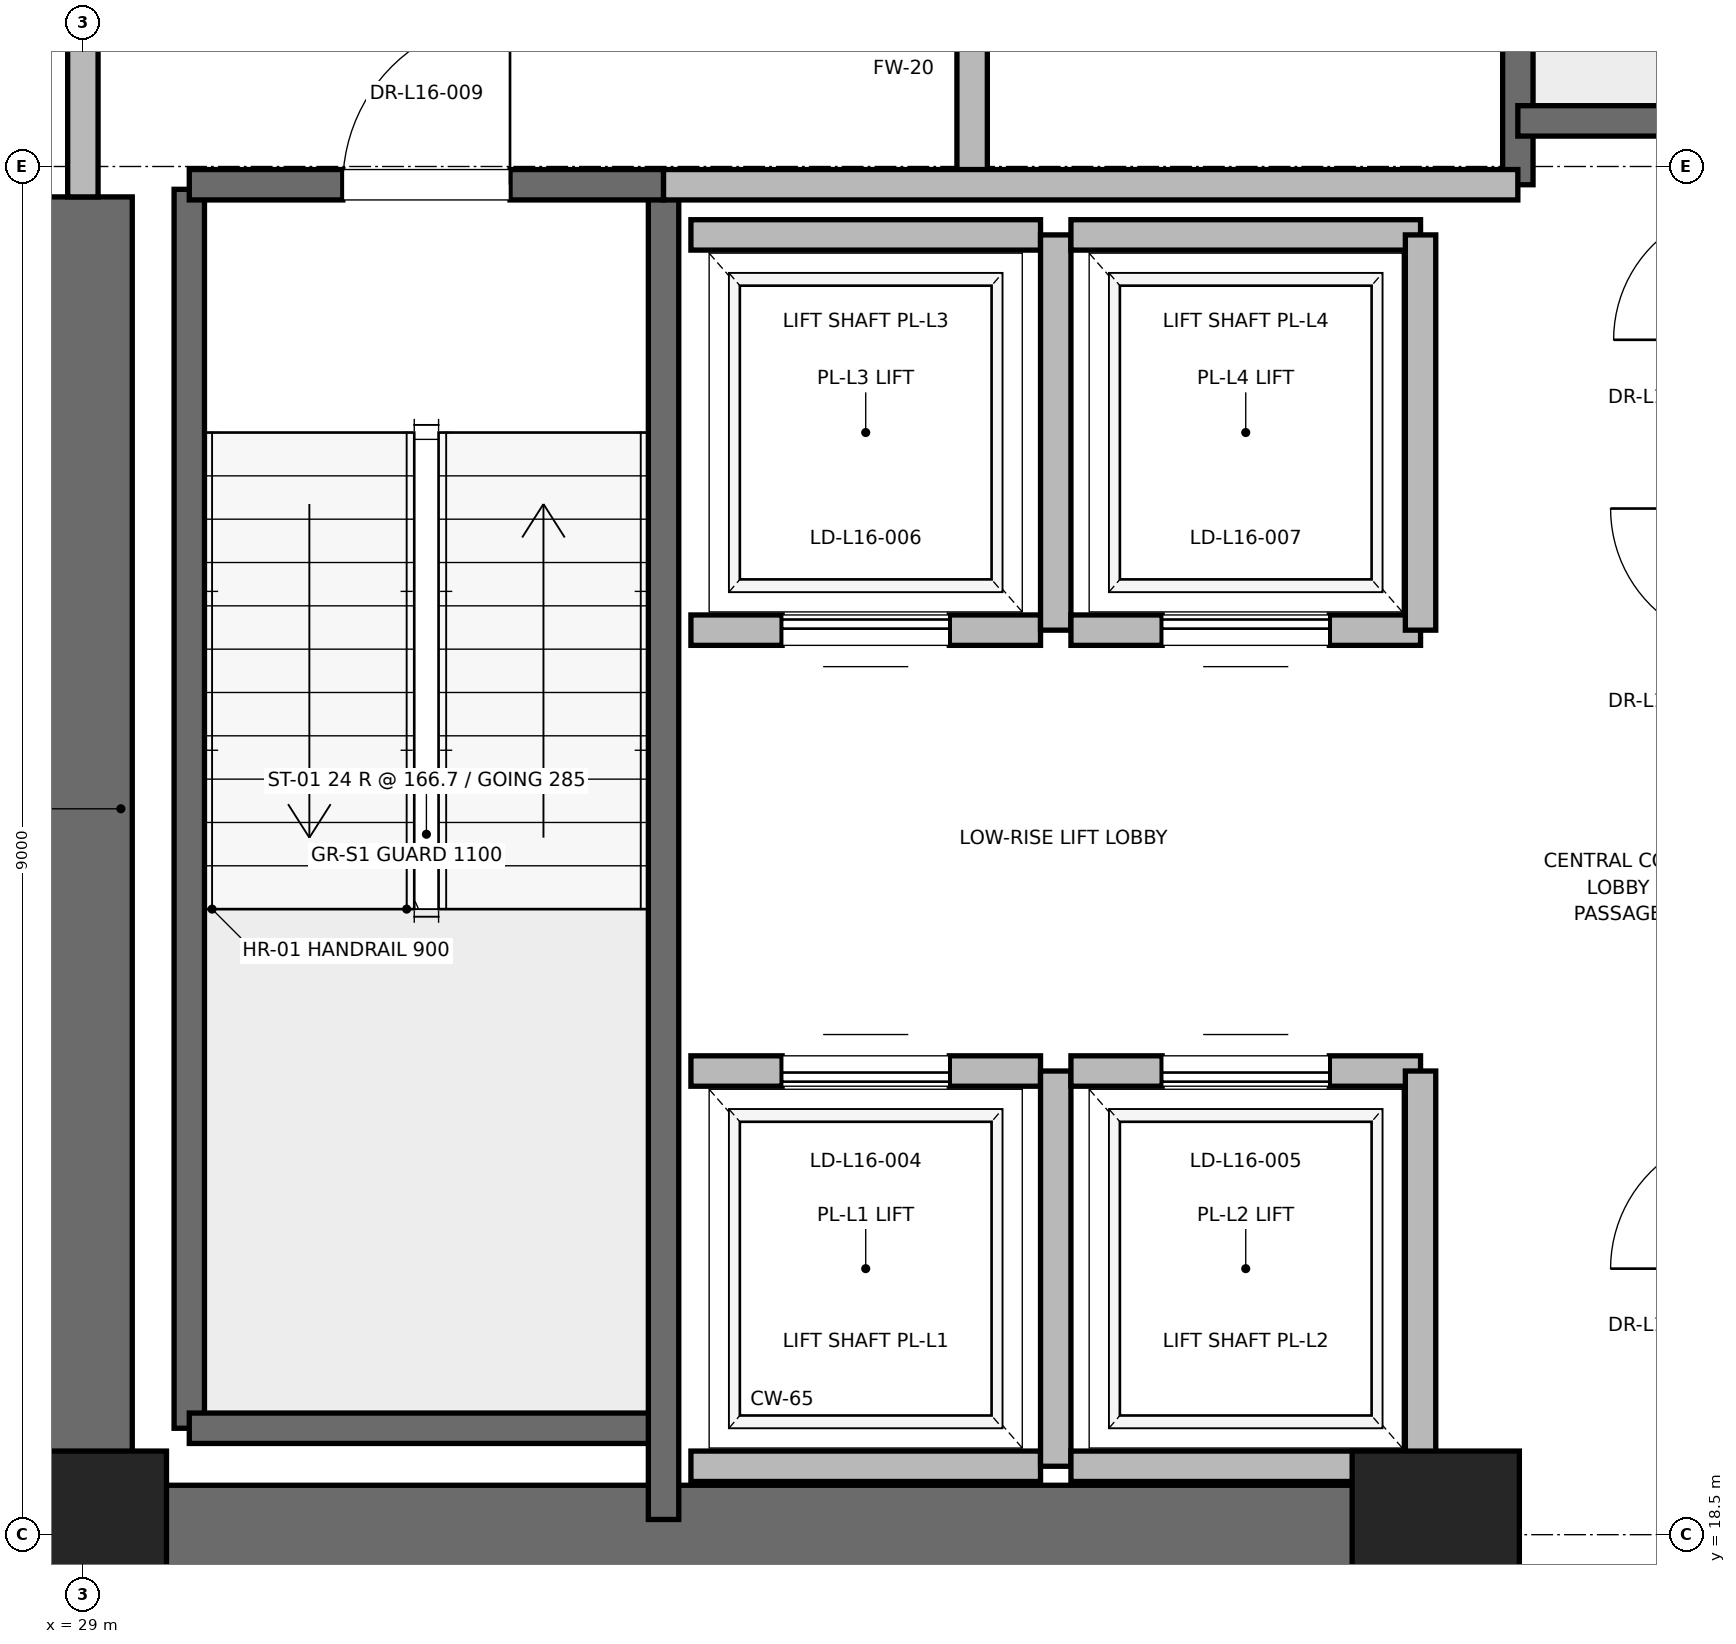
"""IFC4 building model, lengths in metres.
Left out: names, types, materials, properties, quantities, classifications, styles, units other than length and angle.
Written with IfcOpenShell. Run it as: python <this file> out.ifc"""

import sys

from ifc_helpers import new_model, si_unit, direction, frame, frame_2d, origin, origin_2d, place, context, subcontext, project, spatial, rectangle, extrude, element, fill, save


model = new_model("IFC4")
c1 = context("Model", 3, precision=1e-05, world=origin(), true_north=direction((0.0, 1.0)))
c2 = subcontext(c1, "Body", "Model", "MODEL_VIEW")
j1 = project(units=[si_unit("LENGTHUNIT", "METRE"), si_unit("PLANEANGLEUNIT", "RADIAN")], contexts=[c1])
p1 = place(None, origin())
s1 = spatial("IfcSite", under=j1, at=p1, CompositionType="ELEMENT")
p2 = place(p1, origin())
s2 = spatial("IfcBuilding", under=s1, at=p2, CompositionType="ELEMENT")
p3 = place(p2, frame((0.0, 0.0, 71.6)))
s3 = spatial("IfcBuildingStorey", under=s2, at=p3, CompositionType="ELEMENT", Elevation=71.6)
for number, where, z_axis, x_axis in (
    (1, (29.0, 18.5, 0.0), (0.0, 0.0, 1.0), (1.0, 0.0, 0.0)),
    (2, (37.9, 18.5, 0.0), (0.0, 0.0, 1.0), (1.0, 0.0, 0.0)),
):
    element("IfcColumn", number, at=place(p3, frame(where, z_axis=z_axis, x_axis=x_axis)), inside=s3, PredefinedType="PILASTER", context=c2, shape_type="SweptSolid", body=[
        extrude(rectangle(XDim=1.1, YDim=1.1, at=origin_2d()), origin(), (0.0, 0.0, 1.0), 4.0),
    ])
p4 = place(p3, frame((29.0, 18.5, 0.0), z_axis=(0.0, 0.0, 1.0), x_axis=(1.0, 0.0, 0.0)))
e3 = element("IfcWall", 3, at=p4, inside=s3, PredefinedType="SHEAR", context=c2, shape_type="SweptSolid", body=[
    extrude(rectangle(XDim=9.2, YDim=0.65, at=frame_2d((4.6, 0.0))), origin(), (0.0, 0.0, 1.0), 3.76),
])
p5 = place(p3, frame((29.0, 18.5, 0.0), z_axis=(0.0, 0.0, 1.0), x_axis=(0.0, 1.0, 0.0)))
e4 = element("IfcWall", 4, at=p5, inside=s3, PredefinedType="SHEAR", context=c2, shape_type="SweptSolid", body=[
    extrude(rectangle(XDim=8.8, YDim=0.65, at=frame_2d((4.4, 0.0))), origin(), (0.0, 0.0, 1.0), 3.76),
])
p6 = place(p3, frame((29.7, 19.2, 0.0), z_axis=(0.0, 0.0, 1.0), x_axis=(0.0, 1.0, 0.0)))
e5 = element("IfcWall", 5, at=p6, inside=s3, PredefinedType="SOLIDWALL", context=c2, shape_type="SweptSolid", body=[
    extrude(rectangle(XDim=8.15, YDim=0.2, at=frame_2d((4.075, 0.0))), origin(), (0.0, 0.0, 1.0), 3.76),
])
p7 = place(p3, frame((29.7, 19.2, 0.0), z_axis=(0.0, 0.0, 1.0), x_axis=(1.0, 0.0, 0.0)))
e6 = element("IfcWall", 6, at=p7, inside=s3, PredefinedType="SOLIDWALL", context=c2, shape_type="SweptSolid", body=[
    extrude(rectangle(XDim=3.12, YDim=0.2, at=frame_2d((1.56, 0.0))), origin(), (0.0, 0.0, 1.0), 3.76),
])
p8 = place(p3, frame((32.82, 18.6, 0.0), z_axis=(0.0, 0.0, 1.0), x_axis=(0.0, 1.0, 0.0)))
e7 = element("IfcWall", 7, at=p8, inside=s3, PredefinedType="SOLIDWALL", context=c2, shape_type="SweptSolid", body=[
    extrude(rectangle(XDim=8.78, YDim=0.2, at=frame_2d((4.39, 0.0))), origin(), (0.0, 0.0, 1.0), 3.76),
])
p9 = place(p3, frame((29.7, 27.38, 0.0), z_axis=(0.0, 0.0, 1.0), x_axis=(1.0, 0.0, 0.0)))
e8 = element("IfcWall", 8, at=p9, inside=s3, PredefinedType="SOLIDWALL", context=c2, shape_type="SweptSolid", body=[
    extrude(rectangle(XDim=3.12, YDim=0.2, at=frame_2d((1.56, 0.0))), origin(), (0.0, 0.0, 1.0), 3.76),
])
p10 = place(p9, frame((1.01, 0.0, 0.0)))
e9 = element("IfcOpeningElement", 9, at=p10, cuts=e8, PredefinedType="OPENING", context=c2, shape_type="SweptSolid", body=[
    extrude(rectangle(XDim=1.1, YDim=2.15, at=frame_2d((0.55, 1.075))), frame((0.0, 0.1, 0.0), z_axis=(0.0, -1.0, 0.0), x_axis=(1.0, 0.0, 0.0)), (0.0, 0.0, 1.0), 0.2),
])
p11 = place(p3, frame((38.44, 27.38, 0.0), z_axis=(0.0, 0.0, 1.0), x_axis=(0.0, 1.0, 0.0)))
e10 = element("IfcWall", 10, at=p11, inside=s3, PredefinedType="SOLIDWALL", context=c2, shape_type="SweptSolid", body=[
    extrude(rectangle(XDim=8.87, YDim=0.2, at=frame_2d((4.435, 0.0))), origin(), (0.0, 0.0, 1.0), 3.76),
])
p12 = place(p3, frame((38.44, 27.8, 0.0), z_axis=(0.0, 0.0, 1.0), x_axis=(1.0, 0.0, 0.0)))
e11 = element("IfcWall", 11, at=p12, inside=s3, PredefinedType="SOLIDWALL", context=c2, shape_type="SweptSolid", body=[
    extrude(rectangle(XDim=3.32, YDim=0.2, at=frame_2d((1.66, 0.0))), origin(), (0.0, 0.0, 1.0), 3.76),
])
p13 = place(p3, frame((34.85, 27.38, 0.0), z_axis=(0.0, 0.0, 1.0), x_axis=(0.0, 1.0, 0.0)))
e12 = element("IfcWall", 12, at=p13, inside=s3, PredefinedType="PARTITIONING", context=c2, shape_type="SweptSolid", body=[
    extrude(rectangle(XDim=3.37, YDim=0.2, at=frame_2d((1.685, 0.0))), origin(), (0.0, 0.0, 1.0), 3.76),
])
p14 = place(p13, frame((1.11, 0.0, 0.0)))
e13 = element("IfcOpeningElement", 13, at=p14, cuts=e12, PredefinedType="OPENING", context=c2, shape_type="SweptSolid", body=[
    extrude(rectangle(XDim=1.15, YDim=2.2, at=frame_2d((0.575, 1.1))), frame((0.0, 0.1, 0.0), z_axis=(0.0, -1.0, 0.0), x_axis=(1.0, 0.0, 0.0)), (0.0, 0.0, 1.0), 0.2),
])
p15 = place(p3, frame((29.0, 27.3, 0.0), z_axis=(0.0, 0.0, 1.0), x_axis=(0.0, 1.0, 0.0)))
e14 = element("IfcWall", 14, at=p15, inside=s3, PredefinedType="PARTITIONING", context=c2, shape_type="SweptSolid", body=[
    extrude(rectangle(XDim=3.4, YDim=0.2, at=frame_2d((1.7, 0.0))), origin(), (0.0, 0.0, 1.0), 2.54),
])
p16 = place(p15, frame((1.125, 0.0, 0.0)))
e15 = element("IfcOpeningElement", 15, at=p16, cuts=e14, PredefinedType="OPENING", context=c2, shape_type="SweptSolid", body=[
    extrude(rectangle(XDim=1.15, YDim=2.2, at=frame_2d((0.575, 1.1))), frame((0.0, 0.1, 0.0), z_axis=(0.0, -1.0, 0.0), x_axis=(1.0, 0.0, 0.0)), (0.0, 0.0, 1.0), 0.2),
])
p17 = place(p3, frame((32.82, 27.38, 0.0), z_axis=(0.0, 0.0, 1.0), x_axis=(1.0, 0.0, 0.0)))
e16 = element("IfcWall", 16, at=p17, inside=s3, PredefinedType="PARTITIONING", context=c2, shape_type="SweptSolid", body=[
    extrude(rectangle(XDim=5.62, YDim=0.2, at=frame_2d((2.81, 0.0))), origin(), (0.0, 0.0, 1.0), 3.76),
])
p18 = place(p3, frame((33.0, 18.95, 0.0), z_axis=(0.0, 0.0, 1.0), x_axis=(1.0, 0.0, 0.0)))
e17 = element("IfcWall", 17, at=p18, inside=s3, PredefinedType="SOLIDWALL", context=c2, shape_type="SweptSolid", body=[
    extrude(rectangle(XDim=2.3, YDim=0.2, at=frame_2d((1.15, 0.0))), origin(), (0.0, 0.0, 1.0), 3.76),
])
p19 = place(p3, frame((35.3, 21.55, 0.0), z_axis=(0.0, 0.0, 1.0), x_axis=(-1.0, 0.0, 0.0)))
e18 = element("IfcWall", 18, at=p19, inside=s3, PredefinedType="SOLIDWALL", context=c2, shape_type="SweptSolid", body=[
    extrude(rectangle(XDim=2.3, YDim=0.2, at=frame_2d((1.15, 0.0))), origin(), (0.0, 0.0, 1.0), 3.76),
])
p20 = place(p19, frame((0.6, 0.0, 0.0)))
e19 = element("IfcOpeningElement", 19, at=p20, cuts=e18, PredefinedType="OPENING", context=c2, shape_type="SweptSolid", body=[
    extrude(rectangle(XDim=1.1, YDim=2.2, at=frame_2d((0.55, 1.1))), frame((0.0, 0.1, 0.0), z_axis=(0.0, -1.0, 0.0), x_axis=(1.0, 0.0, 0.0)), (0.0, 0.0, 1.0), 0.2),
])
p21 = place(p3, frame((35.4, 18.95, 0.0), z_axis=(0.0, 0.0, 1.0), x_axis=(0.0, 1.0, 0.0)))
e20 = element("IfcWall", 20, at=p21, inside=s3, PredefinedType="SOLIDWALL", context=c2, shape_type="SweptSolid", body=[
    extrude(rectangle(XDim=2.6, YDim=0.2, at=frame_2d((1.3, 0.0))), origin(), (0.0, 0.0, 1.0), 3.76),
])
p22 = place(p3, frame((35.5, 18.95, 0.0), z_axis=(0.0, 0.0, 1.0), x_axis=(1.0, 0.0, 0.0)))
e21 = element("IfcWall", 21, at=p22, inside=s3, PredefinedType="SOLIDWALL", context=c2, shape_type="SweptSolid", body=[
    extrude(rectangle(XDim=2.3, YDim=0.2, at=frame_2d((1.15, 0.0))), origin(), (0.0, 0.0, 1.0), 2.54),
])
p23 = place(p3, frame((37.8, 21.55, 0.0), z_axis=(0.0, 0.0, 1.0), x_axis=(-1.0, 0.0, 0.0)))
e22 = element("IfcWall", 22, at=p23, inside=s3, PredefinedType="SOLIDWALL", context=c2, shape_type="SweptSolid", body=[
    extrude(rectangle(XDim=2.3, YDim=0.2, at=frame_2d((1.15, 0.0))), origin(), (0.0, 0.0, 1.0), 3.76),
])
p24 = place(p23, frame((0.6, 0.0, 0.0)))
e23 = element("IfcOpeningElement", 23, at=p24, cuts=e22, PredefinedType="OPENING", context=c2, shape_type="SweptSolid", body=[
    extrude(rectangle(XDim=1.1, YDim=2.2, at=frame_2d((0.55, 1.1))), frame((0.0, 0.1, 0.0), z_axis=(0.0, -1.0, 0.0), x_axis=(1.0, 0.0, 0.0)), (0.0, 0.0, 1.0), 0.2),
])
p25 = place(p3, frame((37.8, 18.95, 0.0), z_axis=(0.0, 0.0, 1.0), x_axis=(0.0, 1.0, 0.0)))
e24 = element("IfcWall", 24, at=p25, inside=s3, PredefinedType="SOLIDWALL", context=c2, shape_type="SweptSolid", body=[
    extrude(rectangle(XDim=2.6, YDim=0.2, at=frame_2d((1.3, 0.0))), origin(), (0.0, 0.0, 1.0), 2.54),
])
p26 = place(p3, frame((33.0, 24.45, 0.0), z_axis=(0.0, 0.0, 1.0), x_axis=(1.0, 0.0, 0.0)))
e25 = element("IfcWall", 25, at=p26, inside=s3, PredefinedType="SOLIDWALL", context=c2, shape_type="SweptSolid", body=[
    extrude(rectangle(XDim=2.3, YDim=0.2, at=frame_2d((1.15, 0.0))), origin(), (0.0, 0.0, 1.0), 3.76),
])
p27 = place(p26, frame((0.6, 0.0, 0.0)))
e26 = element("IfcOpeningElement", 26, at=p27, cuts=e25, PredefinedType="OPENING", context=c2, shape_type="SweptSolid", body=[
    extrude(rectangle(XDim=1.1, YDim=2.2, at=frame_2d((0.55, 1.1))), frame((0.0, 0.1, 0.0), z_axis=(0.0, -1.0, 0.0), x_axis=(1.0, 0.0, 0.0)), (0.0, 0.0, 1.0), 0.2),
])
p28 = place(p3, frame((35.3, 27.05, 0.0), z_axis=(0.0, 0.0, 1.0), x_axis=(-1.0, 0.0, 0.0)))
e27 = element("IfcWall", 27, at=p28, inside=s3, PredefinedType="SOLIDWALL", context=c2, shape_type="SweptSolid", body=[
    extrude(rectangle(XDim=2.3, YDim=0.2, at=frame_2d((1.15, 0.0))), origin(), (0.0, 0.0, 1.0), 3.76),
])
p29 = place(p3, frame((35.4, 24.45, 0.0), z_axis=(0.0, 0.0, 1.0), x_axis=(0.0, 1.0, 0.0)))
e28 = element("IfcWall", 28, at=p29, inside=s3, PredefinedType="SOLIDWALL", context=c2, shape_type="SweptSolid", body=[
    extrude(rectangle(XDim=2.6, YDim=0.2, at=frame_2d((1.3, 0.0))), origin(), (0.0, 0.0, 1.0), 3.76),
])
p30 = place(p3, frame((35.5, 24.45, 0.0), z_axis=(0.0, 0.0, 1.0), x_axis=(1.0, 0.0, 0.0)))
e29 = element("IfcWall", 29, at=p30, inside=s3, PredefinedType="SOLIDWALL", context=c2, shape_type="SweptSolid", body=[
    extrude(rectangle(XDim=2.3, YDim=0.2, at=frame_2d((1.15, 0.0))), origin(), (0.0, 0.0, 1.0), 3.76),
])
p31 = place(p30, frame((0.6, 0.0, 0.0)))
e30 = element("IfcOpeningElement", 30, at=p31, cuts=e29, PredefinedType="OPENING", context=c2, shape_type="SweptSolid", body=[
    extrude(rectangle(XDim=1.1, YDim=2.2, at=frame_2d((0.55, 1.1))), frame((0.0, 0.1, 0.0), z_axis=(0.0, -1.0, 0.0), x_axis=(1.0, 0.0, 0.0)), (0.0, 0.0, 1.0), 0.2),
])
p32 = place(p3, frame((37.8, 27.05, 0.0), z_axis=(0.0, 0.0, 1.0), x_axis=(-1.0, 0.0, 0.0)))
e31 = element("IfcWall", 31, at=p32, inside=s3, PredefinedType="SOLIDWALL", context=c2, shape_type="SweptSolid", body=[
    extrude(rectangle(XDim=2.3, YDim=0.2, at=frame_2d((1.15, 0.0))), origin(), (0.0, 0.0, 1.0), 3.76),
])
p33 = place(p3, frame((37.8, 24.45, 0.0), z_axis=(0.0, 0.0, 1.0), x_axis=(0.0, 1.0, 0.0)))
e32 = element("IfcWall", 32, at=p33, inside=s3, PredefinedType="SOLIDWALL", context=c2, shape_type="SweptSolid", body=[
    extrude(rectangle(XDim=2.6, YDim=0.2, at=frame_2d((1.3, 0.0))), origin(), (0.0, 0.0, 1.0), 3.76),
])
p34 = place(p10, origin())
e33 = element("IfcDoor", 33, at=p34, inside=s3, OperationType="SINGLE_SWING_RIGHT", PredefinedType="DOOR", context=c2, shape_type="SweptSolid", body=[
    extrude(rectangle(XDim=1.1, YDim=2.15, at=frame_2d((0.55, 1.075))), frame((0.0, 0.025, 0.0), z_axis=(0.0, -1.0, 0.0), x_axis=(1.0, 0.0, 0.0)), (0.0, 0.0, 1.0), 0.05),
])
fill(e9, e33)
p35 = place(p20, origin())
e34 = element("IfcDoor", 34, at=p35, inside=s3, OperationType="SLIDING_TO_RIGHT", PredefinedType="DOOR", context=c2, shape_type="SweptSolid", body=[
    extrude(rectangle(XDim=1.1, YDim=2.2, at=frame_2d((0.55, 1.1))), frame((0.0, 0.025, 0.0), z_axis=(0.0, -1.0, 0.0), x_axis=(1.0, 0.0, 0.0)), (0.0, 0.0, 1.0), 0.05),
])
fill(e19, e34)
p36 = place(p24, origin())
e35 = element("IfcDoor", 35, at=p36, inside=s3, OperationType="SLIDING_TO_RIGHT", PredefinedType="DOOR", context=c2, shape_type="SweptSolid", body=[
    extrude(rectangle(XDim=1.1, YDim=2.2, at=frame_2d((0.55, 1.1))), frame((0.0, 0.025, 0.0), z_axis=(0.0, -1.0, 0.0), x_axis=(1.0, 0.0, 0.0)), (0.0, 0.0, 1.0), 0.05),
])
fill(e23, e35)
p37 = place(p27, origin())
e36 = element("IfcDoor", 36, at=p37, inside=s3, OperationType="SLIDING_TO_RIGHT", PredefinedType="DOOR", context=c2, shape_type="SweptSolid", body=[
    extrude(rectangle(XDim=1.1, YDim=2.2, at=frame_2d((0.55, 1.1))), frame((0.0, 0.025, 0.0), z_axis=(0.0, -1.0, 0.0), x_axis=(1.0, 0.0, 0.0)), (0.0, 0.0, 1.0), 0.05),
])
fill(e26, e36)
p38 = place(p31, origin())
e37 = element("IfcDoor", 37, at=p38, inside=s3, OperationType="SLIDING_TO_RIGHT", PredefinedType="DOOR", context=c2, shape_type="SweptSolid", body=[
    extrude(rectangle(XDim=1.1, YDim=2.2, at=frame_2d((0.55, 1.1))), frame((0.0, 0.025, 0.0), z_axis=(0.0, -1.0, 0.0), x_axis=(1.0, 0.0, 0.0)), (0.0, 0.0, 1.0), 0.05),
])
fill(e30, e37)
save(model, sys.argv[1])
